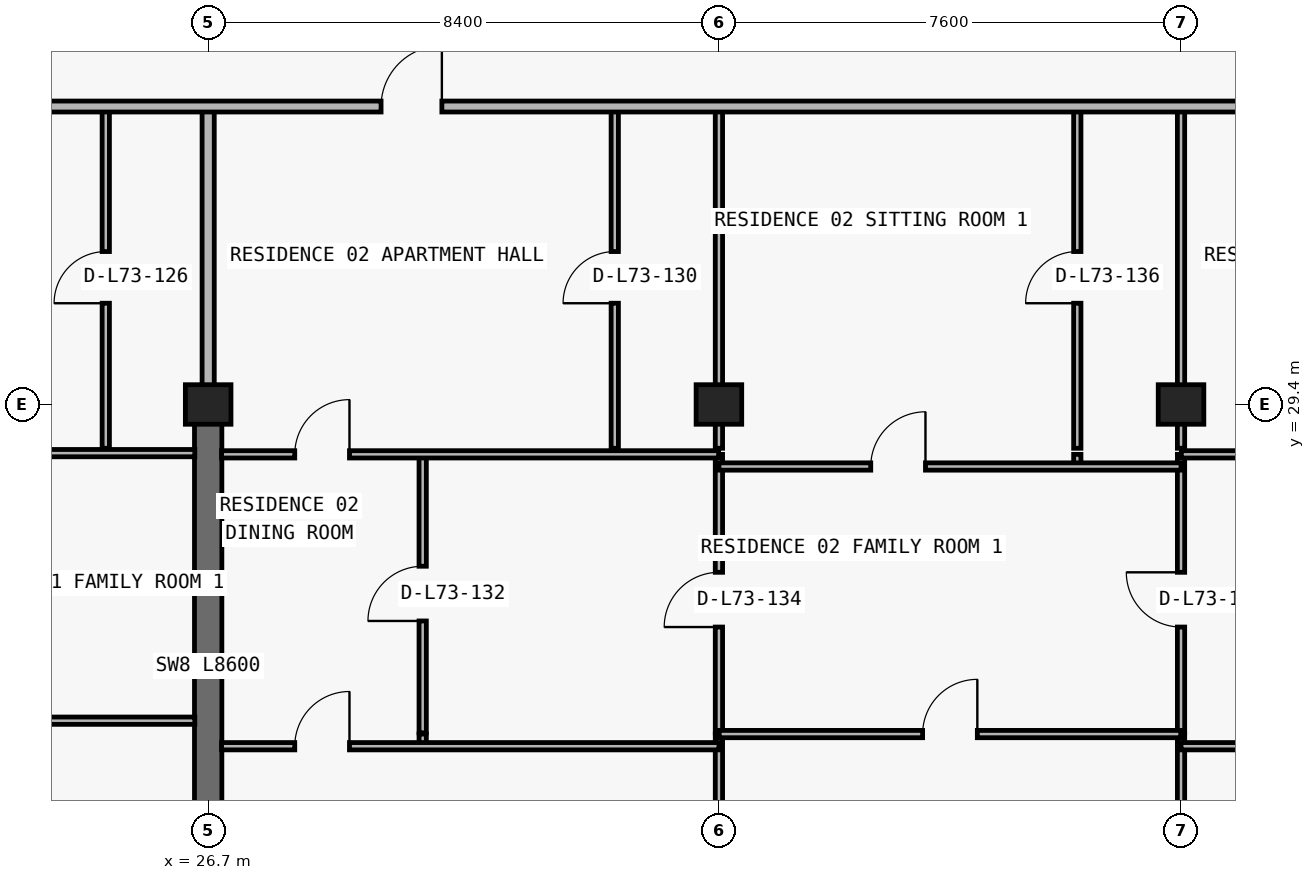
"""IFC4 building model, lengths in metres.
Left out: names, types, materials, properties, quantities, classifications, styles, units other than length and angle.
Written with IfcOpenShell. Run it as: python <this file> out.ifc"""

import sys

from ifc_helpers import new_model, si_unit, direction, frame, frame_2d, origin, origin_2d, place, context, subcontext, project, spatial, rectangle, extrude, element, fill, save


model = new_model("IFC4")
c1 = context("Model", 3, precision=1e-05, world=origin(), true_north=direction((0.0, 1.0)))
c2 = subcontext(c1, "Body", "Model", "MODEL_VIEW")
j1 = project(units=[si_unit("LENGTHUNIT", "METRE"), si_unit("PLANEANGLEUNIT", "RADIAN")], contexts=[c1])
p1 = place(None, origin())
s1 = spatial("IfcSite", under=j1, at=p1, CompositionType="ELEMENT")
p2 = place(p1, origin())
s2 = spatial("IfcBuilding", under=s1, at=p2, CompositionType="ELEMENT")
p3 = place(p2, frame((0.0, 0.0, 259.5)))
s3 = spatial("IfcBuildingStorey", under=s2, at=p3, CompositionType="ELEMENT", Elevation=259.5)
for number, where, z_axis, x_axis in (
    (1, (26.7, 29.4, 0.0), (0.0, 0.0, 1.0), (1.0, 0.0, 0.0)),
    (2, (35.1, 29.4, 0.0), (0.0, 0.0, 1.0), (1.0, 0.0, 0.0)),
    (3, (42.7, 29.4, 0.0), (0.0, 0.0, 1.0), (1.0, 0.0, 0.0)),
):
    element("IfcColumn", number, at=place(p3, frame(where, z_axis=z_axis, x_axis=x_axis)), inside=s3, PredefinedType="COLUMN", context=c2, shape_type="SweptSolid", body=[
        extrude(rectangle(XDim=0.75, YDim=0.65, at=origin_2d()), origin(), (0.0, 0.0, 1.0), 3.05),
    ])
p4 = place(p3, frame((26.7, 20.8, 0.0), z_axis=(0.0, 0.0, 1.0), x_axis=(0.0, 1.0, 0.0)))
e4 = element("IfcWall", 4, at=p4, inside=s3, PredefinedType="SHEAR", context=c2, shape_type="SweptSolid", body=[
    extrude(rectangle(XDim=8.6, YDim=0.45, at=frame_2d((4.3, 0.0))), origin(), (0.0, 0.0, 1.0), 3.05),
])
p5 = place(p3, frame((25.016, 28.68, 0.0), z_axis=(0.0, 0.0, 1.0), x_axis=(0.0, 1.0, 0.0)))
e5 = element("IfcWall", 5, at=p5, inside=s3, PredefinedType="PARTITIONING", context=c2, shape_type="SweptSolid", body=[
    extrude(rectangle(XDim=5.62, YDim=0.12, at=frame_2d((2.81, 0.0))), origin(), (0.0, 0.0, 1.0), 3.05),
])
p6 = place(p5, frame((2.385, 0.0, 0.0)))
e6 = element("IfcOpeningElement", 6, at=p6, cuts=e5, PredefinedType="OPENING", context=c2, shape_type="SweptSolid", body=[
    extrude(rectangle(XDim=0.85, YDim=2.1, at=frame_2d((0.425, 1.05))), frame((0.0, 0.07, 0.0), z_axis=(0.0, -1.0, 0.0), x_axis=(1.0, 0.0, 0.0)), (0.0, 0.0, 1.0), 0.14),
])
p7 = place(p3, frame((26.7, 29.405, 0.0), z_axis=(0.0, 0.0, 1.0), x_axis=(0.0, 1.0, 0.0)))
e7 = element("IfcWall", 7, at=p7, inside=s3, PredefinedType="PARTITIONING", context=c2, shape_type="SweptSolid", body=[
    extrude(rectangle(XDim=4.895, YDim=0.2, at=frame_2d((2.448, 0.0))), origin(), (0.0, 0.0, 1.0), 2.335),
])
p8 = place(p3, frame((30.228, 23.83, 0.0), z_axis=(0.0, 0.0, 1.0), x_axis=(0.0, 1.0, 0.0)))
e8 = element("IfcWall", 8, at=p8, inside=s3, PredefinedType="PARTITIONING", context=c2, shape_type="SweptSolid", body=[
    extrude(rectangle(XDim=0.15, YDim=0.12, at=frame_2d((0.075, 0.0))), origin(), (0.0, 0.0, 1.0), 3.05),
])
p9 = place(p3, frame((30.228, 24.0, 0.0), z_axis=(0.0, 0.0, 1.0), x_axis=(0.0, 1.0, 0.0)))
e9 = element("IfcWall", 9, at=p9, inside=s3, PredefinedType="PARTITIONING", context=c2, shape_type="SweptSolid", body=[
    extrude(rectangle(XDim=4.58, YDim=0.12, at=frame_2d((2.29, 0.0))), origin(), (0.0, 0.0, 1.0), 3.05),
])
p10 = place(p9, frame((1.84, 0.0, 0.0)))
e10 = element("IfcOpeningElement", 10, at=p10, cuts=e9, PredefinedType="OPENING", context=c2, shape_type="SweptSolid", body=[
    extrude(rectangle(XDim=0.9, YDim=2.15, at=frame_2d((0.45, 1.075))), frame((0.0, 0.07, 0.0), z_axis=(0.0, -1.0, 0.0), x_axis=(1.0, 0.0, 0.0)), (0.0, 0.0, 1.0), 0.14),
])
p11 = place(p3, frame((33.387, 28.68, 0.0), z_axis=(0.0, 0.0, 1.0), x_axis=(0.0, 1.0, 0.0)))
e11 = element("IfcWall", 11, at=p11, inside=s3, PredefinedType="PARTITIONING", context=c2, shape_type="SweptSolid", body=[
    extrude(rectangle(XDim=5.62, YDim=0.12, at=frame_2d((2.81, 0.0))), origin(), (0.0, 0.0, 1.0), 3.05),
])
p12 = place(p11, frame((2.385, 0.0, 0.0)))
e12 = element("IfcOpeningElement", 12, at=p12, cuts=e11, PredefinedType="OPENING", context=c2, shape_type="SweptSolid", body=[
    extrude(rectangle(XDim=0.85, YDim=2.1, at=frame_2d((0.425, 1.05))), frame((0.0, 0.07, 0.0), z_axis=(0.0, -1.0, 0.0), x_axis=(1.0, 0.0, 0.0)), (0.0, 0.0, 1.0), 0.14),
])
p13 = place(p3, frame((35.1, 13.34, 0.0), z_axis=(0.0, 0.0, 1.0), x_axis=(0.0, 1.0, 0.0)))
e13 = element("IfcWall", 13, at=p13, inside=s3, PredefinedType="PARTITIONING", context=c2, shape_type="SweptSolid", body=[
    extrude(rectangle(XDim=10.44, YDim=0.12, at=frame_2d((5.22, 0.0))), origin(), (0.0, 0.0, 1.0), 2.263),
])
p14 = place(p3, frame((35.1, 23.83, 0.0), z_axis=(0.0, 0.0, 1.0), x_axis=(0.0, 1.0, 0.0)))
e14 = element("IfcWall", 14, at=p14, inside=s3, PredefinedType="PARTITIONING", context=c2, shape_type="SweptSolid", body=[
    extrude(rectangle(XDim=0.15, YDim=0.12, at=frame_2d((0.075, 0.0))), origin(), (0.0, 0.0, 1.0), 2.263),
])
p15 = place(p3, frame((35.1, 24.0, 0.0), z_axis=(0.0, 0.0, 1.0), x_axis=(0.0, 1.0, 0.0)))
e15 = element("IfcWall", 15, at=p15, inside=s3, PredefinedType="PARTITIONING", context=c2, shape_type="SweptSolid", body=[
    extrude(rectangle(XDim=4.58, YDim=0.12, at=frame_2d((2.29, 0.0))), origin(), (0.0, 0.0, 1.0), 2.263),
])
p16 = place(p15, frame((1.74, 0.0, 0.0)))
e16 = element("IfcOpeningElement", 16, at=p16, cuts=e15, PredefinedType="OPENING", context=c2, shape_type="SweptSolid", body=[
    extrude(rectangle(XDim=0.9, YDim=2.15, at=frame_2d((0.45, 1.075))), frame((0.0, 0.07, 0.0), z_axis=(0.0, -1.0, 0.0), x_axis=(1.0, 0.0, 0.0)), (0.0, 0.0, 1.0), 0.14),
])
p17 = place(p3, frame((35.1, 28.68, 0.0), z_axis=(0.0, 0.0, 1.0), x_axis=(0.0, 1.0, 0.0)))
e17 = element("IfcWall", 17, at=p17, inside=s3, PredefinedType="PARTITIONING", context=c2, shape_type="SweptSolid", body=[
    extrude(rectangle(XDim=5.62, YDim=0.12, at=frame_2d((2.81, 0.0))), origin(), (0.0, 0.0, 1.0), 2.263),
])
p18 = place(p3, frame((40.994, 28.38, 0.0), z_axis=(0.0, 0.0, 1.0), x_axis=(0.0, 1.0, 0.0)))
e18 = element("IfcWall", 18, at=p18, inside=s3, PredefinedType="PARTITIONING", context=c2, shape_type="SweptSolid", body=[
    extrude(rectangle(XDim=0.2, YDim=0.12, at=frame_2d((0.1, 0.0))), origin(), (0.0, 0.0, 1.0), 2.629),
])
p19 = place(p3, frame((40.994, 28.68, 0.0), z_axis=(0.0, 0.0, 1.0), x_axis=(0.0, 1.0, 0.0)))
e19 = element("IfcWall", 19, at=p19, inside=s3, PredefinedType="PARTITIONING", context=c2, shape_type="SweptSolid", body=[
    extrude(rectangle(XDim=5.62, YDim=0.12, at=frame_2d((2.81, 0.0))), origin(), (0.0, 0.0, 1.0), 2.629),
])
p20 = place(p19, frame((2.385, 0.0, 0.0)))
e20 = element("IfcOpeningElement", 20, at=p20, cuts=e19, PredefinedType="OPENING", context=c2, shape_type="SweptSolid", body=[
    extrude(rectangle(XDim=0.85, YDim=2.1, at=frame_2d((0.425, 1.05))), frame((0.0, 0.07, 0.0), z_axis=(0.0, -1.0, 0.0), x_axis=(1.0, 0.0, 0.0)), (0.0, 0.0, 1.0), 0.14),
])
p21 = place(p3, frame((42.7, 13.34, 0.0), z_axis=(0.0, 0.0, 1.0), x_axis=(0.0, 1.0, 0.0)))
e21 = element("IfcWall", 21, at=p21, inside=s3, PredefinedType="PARTITIONING", context=c2, shape_type="SweptSolid", body=[
    extrude(rectangle(XDim=10.44, YDim=0.12, at=frame_2d((5.22, 0.0))), origin(), (0.0, 0.0, 1.0), 2.263),
])
p22 = place(p3, frame((42.7, 23.83, 0.0), z_axis=(0.0, 0.0, 1.0), x_axis=(0.0, 1.0, 0.0)))
e22 = element("IfcWall", 22, at=p22, inside=s3, PredefinedType="PARTITIONING", context=c2, shape_type="SweptSolid", body=[
    extrude(rectangle(XDim=0.15, YDim=0.12, at=frame_2d((0.075, 0.0))), origin(), (0.0, 0.0, 1.0), 2.263),
])
p23 = place(p3, frame((42.7, 24.0, 0.0), z_axis=(0.0, 0.0, 1.0), x_axis=(0.0, 1.0, 0.0)))
e23 = element("IfcWall", 23, at=p23, inside=s3, PredefinedType="PARTITIONING", context=c2, shape_type="SweptSolid", body=[
    extrude(rectangle(XDim=4.58, YDim=0.12, at=frame_2d((2.29, 0.0))), origin(), (0.0, 0.0, 1.0), 2.263),
])
p24 = place(p23, frame((1.74, 0.0, 0.0)))
e24 = element("IfcOpeningElement", 24, at=p24, cuts=e23, PredefinedType="OPENING", context=c2, shape_type="SweptSolid", body=[
    extrude(rectangle(XDim=0.9, YDim=2.15, at=frame_2d((0.45, 1.075))), frame((0.0, 0.07, 0.0), z_axis=(0.0, -1.0, 0.0), x_axis=(1.0, 0.0, 0.0)), (0.0, 0.0, 1.0), 0.14),
])
p25 = place(p3, frame((42.7, 28.68, 0.0), z_axis=(0.0, 0.0, 1.0), x_axis=(0.0, 1.0, 0.0)))
e25 = element("IfcWall", 25, at=p25, inside=s3, PredefinedType="PARTITIONING", context=c2, shape_type="SweptSolid", body=[
    extrude(rectangle(XDim=5.62, YDim=0.12, at=frame_2d((2.81, 0.0))), origin(), (0.0, 0.0, 1.0), 2.263),
])
p26 = place(p3, frame((26.92, 23.78, 0.0), z_axis=(0.0, 0.0, 1.0), x_axis=(1.0, 0.0, 0.0)))
e26 = element("IfcWall", 26, at=p26, inside=s3, PredefinedType="PARTITIONING", context=c2, shape_type="SweptSolid", body=[
    extrude(rectangle(XDim=8.18, YDim=0.12, at=frame_2d((4.09, 0.0))), origin(), (0.0, 0.0, 1.0), 3.05),
])
p27 = place(p26, frame((1.204, 0.0, 0.0)))
e27 = element("IfcOpeningElement", 27, at=p27, cuts=e26, PredefinedType="OPENING", context=c2, shape_type="SweptSolid", body=[
    extrude(rectangle(XDim=0.9, YDim=2.15, at=frame_2d((0.45, 1.075))), frame((0.0, 0.07, 0.0), z_axis=(0.0, -1.0, 0.0), x_axis=(1.0, 0.0, 0.0)), (0.0, 0.0, 1.0), 0.14),
])
p28 = place(p3, frame((42.7, 23.78, 0.0), z_axis=(0.0, 0.0, 1.0), x_axis=(1.0, 0.0, 0.0)))
e28 = element("IfcWall", 28, at=p28, inside=s3, PredefinedType="PARTITIONING", context=c2, shape_type="SweptSolid", body=[
    extrude(rectangle(XDim=8.18, YDim=0.12, at=frame_2d((4.09, 0.0))), origin(), (0.0, 0.0, 1.0), 3.05),
])
p29 = place(p28, frame((3.64, 0.0, 0.0)))
e29 = element("IfcOpeningElement", 29, at=p29, cuts=e28, PredefinedType="OPENING", context=c2, shape_type="SweptSolid", body=[
    extrude(rectangle(XDim=0.9, YDim=2.15, at=frame_2d((0.45, 1.075))), frame((0.0, 0.07, 0.0), z_axis=(0.0, -1.0, 0.0), x_axis=(1.0, 0.0, 0.0)), (0.0, 0.0, 1.0), 0.14),
])
p30 = place(p3, frame((35.105, 23.98, 0.0), z_axis=(0.0, 0.0, 1.0), x_axis=(1.0, 0.0, 0.0)))
e30 = element("IfcWall", 30, at=p30, inside=s3, PredefinedType="PARTITIONING", context=c2, shape_type="SweptSolid", body=[
    extrude(rectangle(XDim=7.59, YDim=0.12, at=frame_2d((3.795, 0.0))), origin(), (0.0, 0.0, 1.0), 3.05),
])
p31 = place(p30, frame((3.345, 0.0, 0.0)))
e31 = element("IfcOpeningElement", 31, at=p31, cuts=e30, PredefinedType="OPENING", context=c2, shape_type="SweptSolid", body=[
    extrude(rectangle(XDim=0.9, YDim=2.15, at=frame_2d((0.45, 1.075))), frame((0.0, 0.07, 0.0), z_axis=(0.0, -1.0, 0.0), x_axis=(1.0, 0.0, 0.0)), (0.0, 0.0, 1.0), 0.14),
])
p32 = place(p3, frame((18.305, 24.2, 0.0), z_axis=(0.0, 0.0, 1.0), x_axis=(1.0, 0.0, 0.0)))
e32 = element("IfcWall", 32, at=p32, inside=s3, PredefinedType="PARTITIONING", context=c2, shape_type="SweptSolid", body=[
    extrude(rectangle(XDim=8.175, YDim=0.12, at=frame_2d((4.087, 0.0))), origin(), (0.0, 0.0, 1.0), 3.05),
])
p33 = place(p32, frame((3.637, 0.0, 0.0)))
e33 = element("IfcOpeningElement", 33, at=p33, cuts=e32, PredefinedType="OPENING", context=c2, shape_type="SweptSolid", body=[
    extrude(rectangle(XDim=0.9, YDim=2.15, at=frame_2d((0.45, 1.075))), frame((0.0, 0.07, 0.0), z_axis=(0.0, -1.0, 0.0), x_axis=(1.0, 0.0, 0.0)), (0.0, 0.0, 1.0), 0.14),
])
p34 = place(p3, frame((35.1, 28.38, 0.0), z_axis=(0.0, 0.0, 1.0), x_axis=(1.0, 0.0, 0.0)))
e34 = element("IfcWall", 34, at=p34, inside=s3, PredefinedType="PARTITIONING", context=c2, shape_type="SweptSolid", body=[
    extrude(rectangle(XDim=7.6, YDim=0.12, at=frame_2d((3.8, 0.0))), origin(), (0.0, 0.0, 1.0), 3.05),
])
p35 = place(p34, frame((2.497, 0.0, 0.0)))
e35 = element("IfcOpeningElement", 35, at=p35, cuts=e34, PredefinedType="OPENING", context=c2, shape_type="SweptSolid", body=[
    extrude(rectangle(XDim=0.9, YDim=2.15, at=frame_2d((0.45, 1.075))), frame((0.0, 0.07, 0.0), z_axis=(0.0, -1.0, 0.0), x_axis=(1.0, 0.0, 0.0)), (0.0, 0.0, 1.0), 0.14),
])
p36 = place(p3, frame((26.92, 28.58, 0.0), z_axis=(0.0, 0.0, 1.0), x_axis=(1.0, 0.0, 0.0)))
e36 = element("IfcWall", 36, at=p36, inside=s3, PredefinedType="PARTITIONING", context=c2, shape_type="SweptSolid", body=[
    extrude(rectangle(XDim=8.175, YDim=0.12, at=frame_2d((4.087, 0.0))), origin(), (0.0, 0.0, 1.0), 3.05),
])
p37 = place(p36, frame((1.204, 0.0, 0.0)))
e37 = element("IfcOpeningElement", 37, at=p37, cuts=e36, PredefinedType="OPENING", context=c2, shape_type="SweptSolid", body=[
    extrude(rectangle(XDim=0.9, YDim=2.15, at=frame_2d((0.45, 1.075))), frame((0.0, 0.07, 0.0), z_axis=(0.0, -1.0, 0.0), x_axis=(1.0, 0.0, 0.0)), (0.0, 0.0, 1.0), 0.14),
])
p38 = place(p3, frame((42.705, 28.58, 0.0), z_axis=(0.0, 0.0, 1.0), x_axis=(1.0, 0.0, 0.0)))
e38 = element("IfcWall", 38, at=p38, inside=s3, PredefinedType="PARTITIONING", context=c2, shape_type="SweptSolid", body=[
    extrude(rectangle(XDim=8.175, YDim=0.12, at=frame_2d((4.087, 0.0))), origin(), (0.0, 0.0, 1.0), 3.05),
])
p39 = place(p38, frame((2.908, 0.0, 0.0)))
e39 = element("IfcOpeningElement", 39, at=p39, cuts=e38, PredefinedType="OPENING", context=c2, shape_type="SweptSolid", body=[
    extrude(rectangle(XDim=0.9, YDim=2.15, at=frame_2d((0.45, 1.075))), frame((0.0, 0.07, 0.0), z_axis=(0.0, -1.0, 0.0), x_axis=(1.0, 0.0, 0.0)), (0.0, 0.0, 1.0), 0.14),
])
p40 = place(p3, frame((18.3, 28.6, 0.0), z_axis=(0.0, 0.0, 1.0), x_axis=(1.0, 0.0, 0.0)))
e40 = element("IfcWall", 40, at=p40, inside=s3, PredefinedType="PARTITIONING", context=c2, shape_type="SweptSolid", body=[
    extrude(rectangle(XDim=8.18, YDim=0.12, at=frame_2d((4.09, 0.0))), origin(), (0.0, 0.0, 1.0), 3.05),
])
p41 = place(p40, frame((2.908, 0.0, 0.0)))
e41 = element("IfcOpeningElement", 41, at=p41, cuts=e40, PredefinedType="OPENING", context=c2, shape_type="SweptSolid", body=[
    extrude(rectangle(XDim=0.9, YDim=2.15, at=frame_2d((0.45, 1.075))), frame((0.0, 0.07, 0.0), z_axis=(0.0, -1.0, 0.0), x_axis=(1.0, 0.0, 0.0)), (0.0, 0.0, 1.0), 0.14),
])
p42 = place(p3, frame((12.105, 34.3, 0.0), z_axis=(0.0, 0.0, 1.0), x_axis=(1.0, 0.0, 0.0)))
e42 = element("IfcWall", 42, at=p42, inside=s3, PredefinedType="PARTITIONING", context=c2, shape_type="SweptSolid", body=[
    extrude(rectangle(XDim=53.595, YDim=0.18, at=frame_2d((26.797, 0.0))), origin(), (0.0, 0.0, 1.0), 3.05),
])
p43 = place(p42, frame((1.661, 0.0, 0.0)))
e43 = element("IfcOpeningElement", 43, at=p43, cuts=e42, PredefinedType="OPENING", context=c2, shape_type="SweptSolid", body=[
    extrude(rectangle(XDim=1.0, YDim=2.2, at=frame_2d((0.5, 1.1))), frame((0.0, 0.1, 0.0), z_axis=(0.0, -1.0, 0.0), x_axis=(1.0, 0.0, 0.0)), (0.0, 0.0, 1.0), 0.2),
])
p44 = place(p42, frame((17.438, 0.0, 0.0)))
e44 = element("IfcOpeningElement", 44, at=p44, cuts=e42, PredefinedType="OPENING", context=c2, shape_type="SweptSolid", body=[
    extrude(rectangle(XDim=1.0, YDim=2.2, at=frame_2d((0.5, 1.1))), frame((0.0, 0.1, 0.0), z_axis=(0.0, -1.0, 0.0), x_axis=(1.0, 0.0, 0.0)), (0.0, 0.0, 1.0), 0.2),
])
p45 = place(p42, frame((41.727, 0.0, 0.0)))
e45 = element("IfcOpeningElement", 45, at=p45, cuts=e42, PredefinedType="OPENING", context=c2, shape_type="SweptSolid", body=[
    extrude(rectangle(XDim=1.0, YDim=2.2, at=frame_2d((0.5, 1.1))), frame((0.0, 0.1, 0.0), z_axis=(0.0, -1.0, 0.0), x_axis=(1.0, 0.0, 0.0)), (0.0, 0.0, 1.0), 0.2),
])
p46 = place(p42, frame((49.141, 0.0, 0.0)))
e46 = element("IfcOpeningElement", 46, at=p46, cuts=e42, PredefinedType="OPENING", context=c2, shape_type="SweptSolid", body=[
    extrude(rectangle(XDim=1.0, YDim=2.2, at=frame_2d((0.5, 1.1))), frame((0.0, 0.1, 0.0), z_axis=(0.0, -1.0, 0.0), x_axis=(1.0, 0.0, 0.0)), (0.0, 0.0, 1.0), 0.2),
])
p47 = place(p6, origin())
e47 = element("IfcDoor", 47, at=p47, inside=s3, OperationType="SINGLE_SWING_LEFT", PredefinedType="DOOR", context=c2, shape_type="SweptSolid", body=[
    extrude(rectangle(XDim=0.85, YDim=2.1, at=frame_2d((0.425, 1.05))), frame((0.0, 0.025, 0.0), z_axis=(0.0, -1.0, 0.0), x_axis=(1.0, 0.0, 0.0)), (0.0, 0.0, 1.0), 0.05),
])
fill(e6, e47)
p48 = place(p44, origin())
e48 = element("IfcDoor", 48, at=p48, inside=s3, OperationType="SINGLE_SWING_RIGHT", PredefinedType="DOOR", context=c2, shape_type="SweptSolid", body=[
    extrude(rectangle(XDim=1.0, YDim=2.2, at=frame_2d((0.5, 1.1))), frame((0.0, 0.025, 0.0), z_axis=(0.0, -1.0, 0.0), x_axis=(1.0, 0.0, 0.0)), (0.0, 0.0, 1.0), 0.05),
])
fill(e44, e48)
p49 = place(p12, origin())
e49 = element("IfcDoor", 49, at=p49, inside=s3, OperationType="SINGLE_SWING_LEFT", PredefinedType="DOOR", context=c2, shape_type="SweptSolid", body=[
    extrude(rectangle(XDim=0.85, YDim=2.1, at=frame_2d((0.425, 1.05))), frame((0.0, 0.025, 0.0), z_axis=(0.0, -1.0, 0.0), x_axis=(1.0, 0.0, 0.0)), (0.0, 0.0, 1.0), 0.05),
])
fill(e12, e49)
p50 = place(p37, origin())
e50 = element("IfcDoor", 50, at=p50, inside=s3, OperationType="SINGLE_SWING_RIGHT", PredefinedType="DOOR", context=c2, shape_type="SweptSolid", body=[
    extrude(rectangle(XDim=0.9, YDim=2.15, at=frame_2d((0.45, 1.075))), frame((0.0, 0.025, 0.0), z_axis=(0.0, -1.0, 0.0), x_axis=(1.0, 0.0, 0.0)), (0.0, 0.0, 1.0), 0.05),
])
fill(e37, e50)
p51 = place(p10, origin())
e51 = element("IfcDoor", 51, at=p51, inside=s3, OperationType="SINGLE_SWING_LEFT", PredefinedType="DOOR", context=c2, shape_type="SweptSolid", body=[
    extrude(rectangle(XDim=0.9, YDim=2.15, at=frame_2d((0.45, 1.075))), frame((0.0, 0.025, 0.0), z_axis=(0.0, -1.0, 0.0), x_axis=(1.0, 0.0, 0.0)), (0.0, 0.0, 1.0), 0.05),
])
fill(e10, e51)
p52 = place(p27, origin())
e52 = element("IfcDoor", 52, at=p52, inside=s3, OperationType="SINGLE_SWING_RIGHT", PredefinedType="DOOR", context=c2, shape_type="SweptSolid", body=[
    extrude(rectangle(XDim=0.9, YDim=2.15, at=frame_2d((0.45, 1.075))), frame((0.0, 0.025, 0.0), z_axis=(0.0, -1.0, 0.0), x_axis=(1.0, 0.0, 0.0)), (0.0, 0.0, 1.0), 0.05),
])
fill(e27, e52)
p53 = place(p16, origin())
e53 = element("IfcDoor", 53, at=p53, inside=s3, OperationType="SINGLE_SWING_LEFT", PredefinedType="DOOR", context=c2, shape_type="SweptSolid", body=[
    extrude(rectangle(XDim=0.9, YDim=2.15, at=frame_2d((0.45, 1.075))), frame((0.0, 0.025, 0.0), z_axis=(0.0, -1.0, 0.0), x_axis=(1.0, 0.0, 0.0)), (0.0, 0.0, 1.0), 0.05),
])
fill(e16, e53)
p54 = place(p35, origin())
e54 = element("IfcDoor", 54, at=p54, inside=s3, OperationType="SINGLE_SWING_RIGHT", PredefinedType="DOOR", context=c2, shape_type="SweptSolid", body=[
    extrude(rectangle(XDim=0.9, YDim=2.15, at=frame_2d((0.45, 1.075))), frame((0.0, 0.025, 0.0), z_axis=(0.0, -1.0, 0.0), x_axis=(1.0, 0.0, 0.0)), (0.0, 0.0, 1.0), 0.05),
])
fill(e35, e54)
p55 = place(p20, origin())
e55 = element("IfcDoor", 55, at=p55, inside=s3, OperationType="SINGLE_SWING_LEFT", PredefinedType="DOOR", context=c2, shape_type="SweptSolid", body=[
    extrude(rectangle(XDim=0.85, YDim=2.1, at=frame_2d((0.425, 1.05))), frame((0.0, 0.025, 0.0), z_axis=(0.0, -1.0, 0.0), x_axis=(1.0, 0.0, 0.0)), (0.0, 0.0, 1.0), 0.05),
])
fill(e20, e55)
p56 = place(p31, origin())
e56 = element("IfcDoor", 56, at=p56, inside=s3, OperationType="SINGLE_SWING_RIGHT", PredefinedType="DOOR", context=c2, shape_type="SweptSolid", body=[
    extrude(rectangle(XDim=0.9, YDim=2.15, at=frame_2d((0.45, 1.075))), frame((0.0, 0.025, 0.0), z_axis=(0.0, -1.0, 0.0), x_axis=(1.0, 0.0, 0.0)), (0.0, 0.0, 1.0), 0.05),
])
fill(e31, e56)
p57 = place(p24, origin())
e57 = element("IfcDoor", 57, at=p57, inside=s3, OperationType="SINGLE_SWING_RIGHT", PredefinedType="DOOR", context=c2, shape_type="SweptSolid", body=[
    extrude(rectangle(XDim=0.9, YDim=2.15, at=frame_2d((0.45, 1.075))), frame((0.0, 0.025, 0.0), z_axis=(0.0, -1.0, 0.0), x_axis=(1.0, 0.0, 0.0)), (0.0, 0.0, 1.0), 0.05),
])
fill(e24, e57)
save(model, sys.argv[1])
